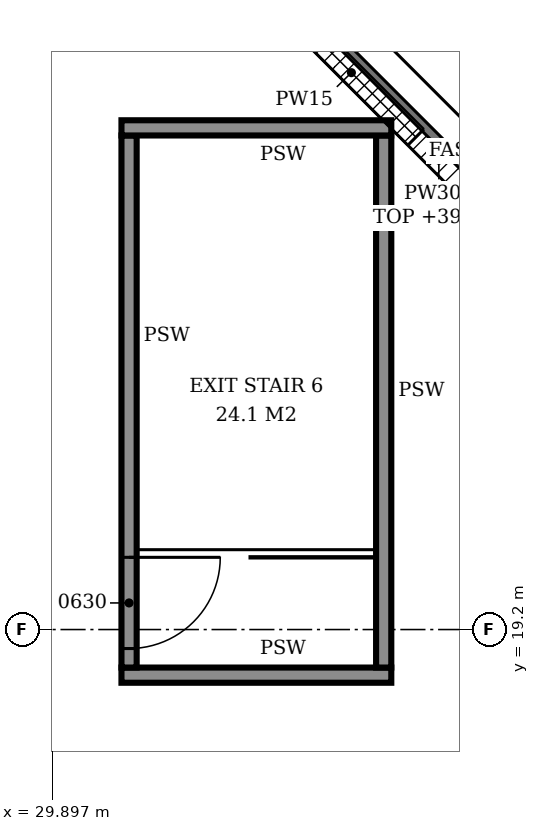
"""IFC4 building model, lengths in metres.
Left out: names, types, materials, properties, quantities, classifications, styles, units other than length and angle.
Written with IfcOpenShell. Run it as: python <this file> out.ifc"""

import sys

from ifc_helpers import new_model, si_unit, direction, frame, frame_2d, origin, place, context, subcontext, project, spatial, rectangle, extrude, element, fill, save


model = new_model("IFC4")
c1 = context("Model", 3, precision=1e-05, world=origin(), true_north=direction((0.0, 1.0)))
c2 = subcontext(c1, "Body", "Model", "MODEL_VIEW")
j1 = project(units=[si_unit("LENGTHUNIT", "METRE"), si_unit("PLANEANGLEUNIT", "RADIAN")], contexts=[c1])
p1 = place(None, origin())
s1 = spatial("IfcSite", under=j1, at=p1, CompositionType="ELEMENT")
p2 = place(p1, origin())
s2 = spatial("IfcBuilding", under=s1, at=p2, CompositionType="ELEMENT")
p3 = place(p2, frame((0.0, 0.0, 35.4)))
s3 = spatial("IfcBuildingStorey", under=s2, at=p3, CompositionType="ELEMENT", Elevation=35.4)
p4 = place(p3, frame((37.277, 23.075, 0.0), z_axis=(0.0, 0.0, 1.0), x_axis=(-0.707088024292, 0.707125537583, 0.0)))
e1 = element("IfcWall", 1, at=p4, inside=s3, PredefinedType="SOLIDWALL", context=c2, shape_type="SweptSolid", body=[
    extrude(rectangle(XDim=6.508, YDim=0.3, at=frame_2d((3.254, 0.0))), origin(), (0.0, 0.0, 1.0), 4.05),
])
p5 = place(p4, frame((0.427, 0.0, 0.9)))
e2 = element("IfcOpeningElement", 2, at=p5, cuts=e1, PredefinedType="OPENING", context=c2, shape_type="SweptSolid", body=[
    extrude(rectangle(XDim=2.4, YDim=1.5, at=frame_2d((1.2, 0.75))), frame((0.0, 0.16, 0.0), z_axis=(0.0, -1.0, 0.0), x_axis=(1.0, 0.0, 0.0)), (0.0, 0.0, 1.0), 0.32),
])
p6 = place(p4, frame((3.681, 0.0, 0.9)))
e3 = element("IfcOpeningElement", 3, at=p6, cuts=e1, PredefinedType="OPENING", context=c2, shape_type="SweptSolid", body=[
    extrude(rectangle(XDim=2.4, YDim=1.5, at=frame_2d((1.2, 0.75))), frame((0.0, 0.16, 0.0), z_axis=(0.0, -1.0, 0.0), x_axis=(1.0, 0.0, 0.0)), (0.0, 0.0, 1.0), 0.32),
])
p7 = place(p3, frame((30.8, 18.6, 0.0), z_axis=(0.0, 0.0, 1.0), x_axis=(1.0, 0.0, 0.0)))
e4 = element("IfcWall", 4, at=p7, inside=s3, PredefinedType="SOLIDWALL", context=c2, shape_type="SweptSolid", body=[
    extrude(rectangle(XDim=3.55, YDim=0.2, at=frame_2d((1.775, 0.0))), origin(), (0.0, 0.0, 1.0), 4.65),
])
p8 = place(p3, frame((30.9, 18.7, 0.0), z_axis=(0.0, 0.0, 1.0), x_axis=(0.0, 1.0, 0.0)))
e5 = element("IfcWall", 5, at=p8, inside=s3, PredefinedType="SOLIDWALL", context=c2, shape_type="SweptSolid", body=[
    extrude(rectangle(XDim=7.0, YDim=0.2, at=frame_2d((3.5, 0.0))), origin(), (0.0, 0.0, 1.0), 4.65),
])
p9 = place(p8, frame((0.25, 0.0, 0.0)))
e6 = element("IfcOpeningElement", 6, at=p9, cuts=e5, PredefinedType="OPENING", context=c2, shape_type="SweptSolid", body=[
    extrude(rectangle(XDim=1.2, YDim=2.1, at=frame_2d((0.6, 1.05))), frame((0.0, 0.11, 0.0), z_axis=(0.0, -1.0, 0.0), x_axis=(1.0, 0.0, 0.0)), (0.0, 0.0, 1.0), 0.22),
])
p10 = place(p3, frame((34.25, 18.7, 0.0), z_axis=(0.0, 0.0, 1.0), x_axis=(0.0, 1.0, 0.0)))
e7 = element("IfcWall", 7, at=p10, inside=s3, PredefinedType="SOLIDWALL", context=c2, shape_type="SweptSolid", body=[
    extrude(rectangle(XDim=7.0, YDim=0.2, at=frame_2d((3.5, 0.0))), origin(), (0.0, 0.0, 1.0), 4.65),
])
p11 = place(p3, frame((30.8, 25.8, 0.0), z_axis=(0.0, 0.0, 1.0), x_axis=(1.0, 0.0, 0.0)))
e8 = element("IfcWall", 8, at=p11, inside=s3, PredefinedType="SOLIDWALL", context=c2, shape_type="SweptSolid", body=[
    extrude(rectangle(XDim=3.55, YDim=0.2, at=frame_2d((1.775, 0.0))), origin(), (0.0, 0.0, 1.0), 4.65),
])
p12 = place(p6, origin())
e9 = element("IfcWindow", 9, at=p12, inside=s3, PartitioningType="SINGLE_PANEL", PredefinedType="WINDOW", context=c2, shape_type="SweptSolid", body=[
    extrude(rectangle(XDim=2.4, YDim=1.5, at=frame_2d((1.2, 0.75))), frame((0.0, 0.03, 0.0), z_axis=(0.0, -1.0, 0.0), x_axis=(1.0, 0.0, 0.0)), (0.0, 0.0, 1.0), 0.06),
])
fill(e3, e9)
p13 = place(p9, frame((1.2, 0.0, 0.0), z_axis=(0.0, 0.0, 1.0), x_axis=(-1.0, 0.0, 0.0)))
e10 = element("IfcDoor", 10, at=p13, inside=s3, OperationType="SINGLE_SWING_LEFT", PredefinedType="DOOR", context=c2, shape_type="SweptSolid", body=[
    extrude(rectangle(XDim=1.2, YDim=2.1, at=frame_2d((0.6, 1.05))), frame((0.0, 0.025, 0.0), z_axis=(0.0, -1.0, 0.0), x_axis=(1.0, 0.0, 0.0)), (0.0, 0.0, 1.0), 0.05),
])
fill(e6, e10)
save(model, sys.argv[1])
